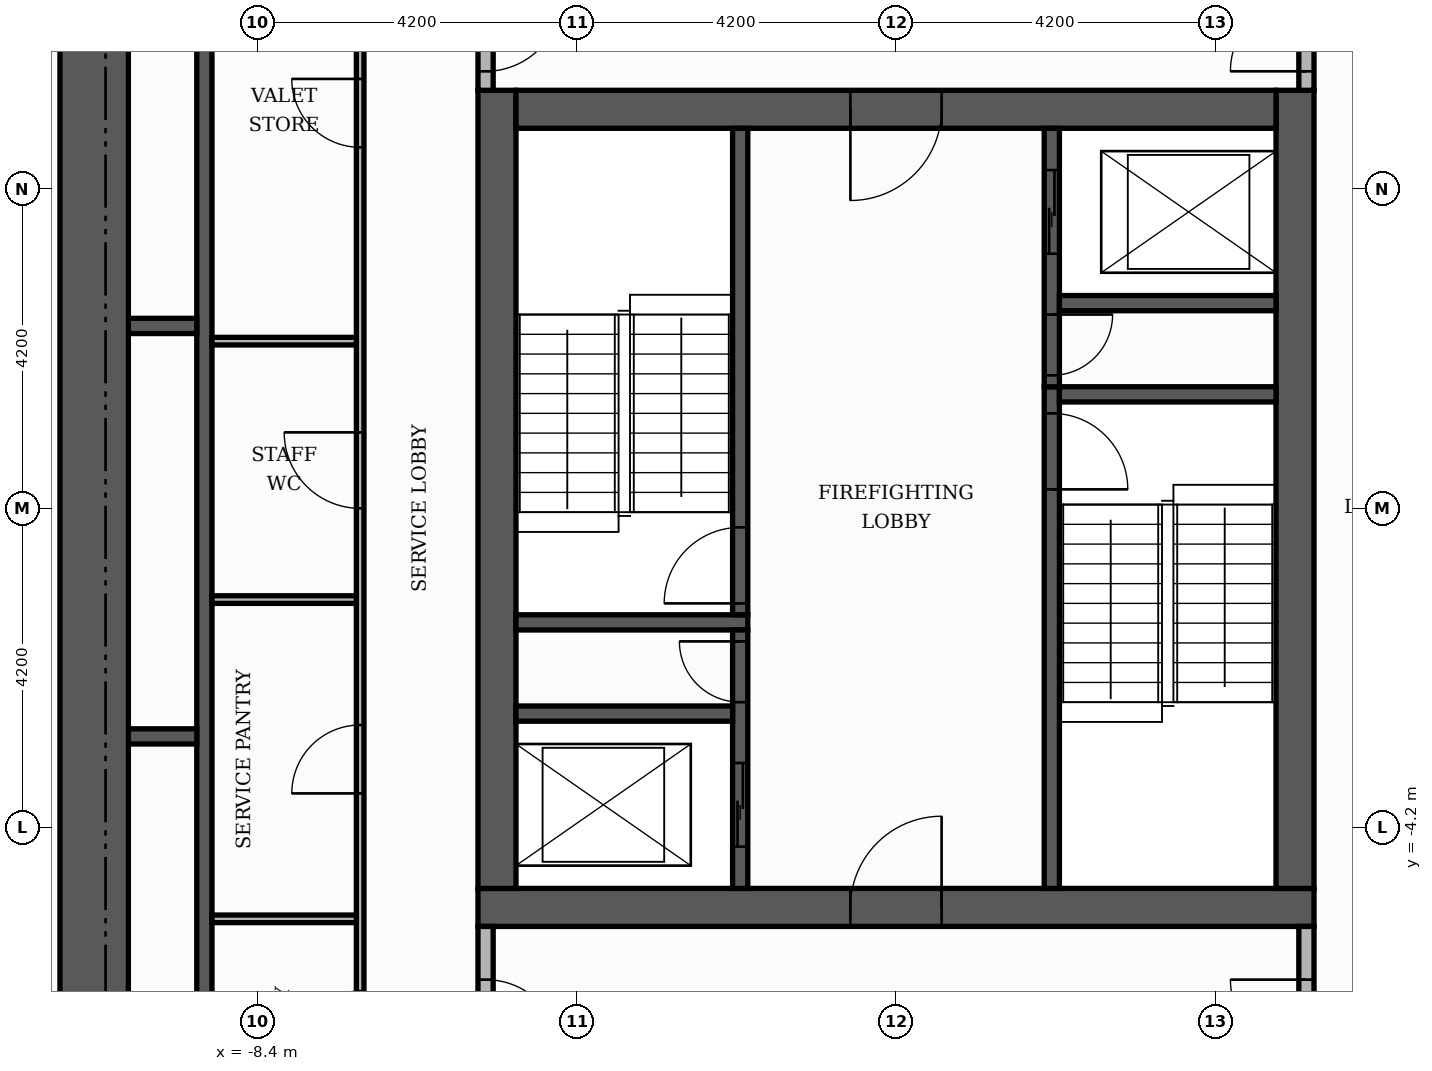
"""IFC4 building model, lengths in metres.
Left out: names, types, materials, properties, quantities, classifications, styles, units other than length and angle.
Written with IfcOpenShell. Run it as: python <this file> out.ifc"""

import sys

from ifc_helpers import new_model, si_unit, direction, frame, frame_2d, origin, place, context, subcontext, project, spatial, rectangle, extrude, element, fill, save


model = new_model("IFC4")
c1 = context("Model", 3, precision=1e-05, world=origin(), true_north=direction((0.0, 1.0)))
c2 = subcontext(c1, "Body", "Model", "MODEL_VIEW")
j1 = project(units=[si_unit("LENGTHUNIT", "METRE"), si_unit("PLANEANGLEUNIT", "RADIAN")], contexts=[c1])
p1 = place(None, origin())
s1 = spatial("IfcSite", under=j1, at=p1, CompositionType="ELEMENT")
p2 = place(p1, origin())
s2 = spatial("IfcBuilding", under=s1, at=p2, CompositionType="ELEMENT")
p3 = place(p2, frame((0.0, 0.0, 219.6)))
s3 = spatial("IfcBuildingStorey", under=s2, at=p3, CompositionType="ELEMENT", Elevation=219.6)
p4 = place(p3, frame((-5.5, -5.25, 0.0), z_axis=(0.0, 0.0, 1.0), x_axis=(1.0, 0.0, 0.0)))
e1 = element("IfcWall", 1, at=p4, inside=s3, PredefinedType="SHEAR", context=c2, shape_type="SweptSolid", body=[
    extrude(rectangle(XDim=11.0, YDim=0.5, at=frame_2d((5.5, 0.0))), origin(), (0.0, 0.0, 1.0), 3.48),
])
p5 = place(p4, frame((4.9, 0.0, 0.0)))
e2 = element("IfcOpeningElement", 2, at=p5, cuts=e1, PredefinedType="OPENING", context=c2, shape_type="SweptSolid", body=[
    extrude(rectangle(XDim=1.2, YDim=2.1, at=frame_2d((0.6, 1.05))), frame((0.0, 0.26, 0.0), z_axis=(0.0, -1.0, 0.0), x_axis=(1.0, 0.0, 0.0)), (0.0, 0.0, 1.0), 0.52),
])
for number, where, z_axis, x_axis in (
    (3, (-5.25, -5.0, 0.0), (0.0, 0.0, 1.0), (0.0, 1.0, 0.0)),
    (4, (5.25, -5.0, 0.0), (0.0, 0.0, 1.0), (0.0, 1.0, 0.0)),
):
    element("IfcWall", number, at=place(p3, frame(where, z_axis=z_axis, x_axis=x_axis)), inside=s3, PredefinedType="SHEAR", context=c2, shape_type="SweptSolid", body=[
        extrude(rectangle(XDim=10.5, YDim=0.5, at=frame_2d((5.25, 0.0))), origin(), (0.0, 0.0, 1.0), 3.48),
    ])
p6 = place(p3, frame((-5.0, 5.25, 0.0), z_axis=(0.0, 0.0, 1.0), x_axis=(1.0, 0.0, 0.0)))
e5 = element("IfcWall", 5, at=p6, inside=s3, PredefinedType="SHEAR", context=c2, shape_type="SweptSolid", body=[
    extrude(rectangle(XDim=10.0, YDim=0.5, at=frame_2d((5.0, 0.0))), origin(), (0.0, 0.0, 1.0), 3.48),
])
p7 = place(p6, frame((4.4, 0.0, 0.0)))
e6 = element("IfcOpeningElement", 6, at=p7, cuts=e5, PredefinedType="OPENING", context=c2, shape_type="SweptSolid", body=[
    extrude(rectangle(XDim=1.2, YDim=2.1, at=frame_2d((0.6, 1.05))), frame((0.0, 0.26, 0.0), z_axis=(0.0, -1.0, 0.0), x_axis=(1.0, 0.0, 0.0)), (0.0, 0.0, 1.0), 0.52),
])
p8 = place(p3, frame((2.05, -5.0, 0.0), z_axis=(0.0, 0.0, 1.0), x_axis=(0.0, 1.0, 0.0)))
e7 = element("IfcWall", 7, at=p8, inside=s3, PredefinedType="SHEAR", context=c2, shape_type="SweptSolid", body=[
    extrude(rectangle(XDim=6.6, YDim=0.2, at=frame_2d((3.3, 0.0))), origin(), (0.0, 0.0, 1.0), 3.48),
])
p9 = place(p8, frame((5.25, 0.0, 0.0)))
e8 = element("IfcOpeningElement", 8, at=p9, cuts=e7, PredefinedType="OPENING", context=c2, shape_type="SweptSolid", body=[
    extrude(rectangle(XDim=1.0, YDim=2.1, at=frame_2d((0.5, 1.05))), frame((0.0, 0.11, 0.0), z_axis=(0.0, -1.0, 0.0), x_axis=(1.0, 0.0, 0.0)), (0.0, 0.0, 1.0), 0.22),
])
p10 = place(p3, frame((-5.0, -1.5, 0.0), z_axis=(0.0, 0.0, 1.0), x_axis=(1.0, 0.0, 0.0)))
e9 = element("IfcWall", 9, at=p10, inside=s3, PredefinedType="SHEAR", context=c2, shape_type="SweptSolid", body=[
    extrude(rectangle(XDim=3.05, YDim=0.2, at=frame_2d((1.525, 0.0))), origin(), (0.0, 0.0, 1.0), 3.48),
])
p11 = place(p3, frame((-2.05, -1.4, 0.0), z_axis=(0.0, 0.0, 1.0), x_axis=(0.0, 1.0, 0.0)))
e10 = element("IfcWall", 10, at=p11, inside=s3, PredefinedType="SHEAR", context=c2, shape_type="SweptSolid", body=[
    extrude(rectangle(XDim=6.4, YDim=0.2, at=frame_2d((3.2, 0.0))), origin(), (0.0, 0.0, 1.0), 3.48),
])
p12 = place(p11, frame((0.15, 0.0, 0.0)))
e11 = element("IfcOpeningElement", 11, at=p12, cuts=e10, PredefinedType="OPENING", context=c2, shape_type="SweptSolid", body=[
    extrude(rectangle(XDim=1.0, YDim=2.1, at=frame_2d((0.5, 1.05))), frame((0.0, 0.11, 0.0), z_axis=(0.0, -1.0, 0.0), x_axis=(1.0, 0.0, 0.0)), (0.0, 0.0, 1.0), 0.22),
])
p13 = place(p3, frame((2.15, 1.5, 0.0), z_axis=(0.0, 0.0, 1.0), x_axis=(1.0, 0.0, 0.0)))
e12 = element("IfcWall", 12, at=p13, inside=s3, PredefinedType="SHEAR", context=c2, shape_type="SweptSolid", body=[
    extrude(rectangle(XDim=2.85, YDim=0.2, at=frame_2d((1.425, 0.0))), origin(), (0.0, 0.0, 1.0), 3.48),
])
p14 = place(p3, frame((-9.1, -8.2, 0.0), z_axis=(0.0, 0.0, 1.0), x_axis=(0.0, 1.0, 0.0)))
e13 = element("IfcWall", 13, at=p14, inside=s3, PredefinedType="SHEAR", context=c2, shape_type="SweptSolid", body=[
    extrude(rectangle(XDim=16.4, YDim=0.2, at=frame_2d((8.2, 0.0))), origin(), (0.0, 0.0, 1.0), 3.48),
])
p15 = place(p3, frame((-2.05, -5.0, 0.0), z_axis=(0.0, 0.0, 1.0), x_axis=(0.0, 1.0, 0.0)))
e14 = element("IfcWall", 14, at=p15, inside=s3, PredefinedType="SHEAR", context=c2, shape_type="SweptSolid", body=[
    extrude(rectangle(XDim=3.4, YDim=0.2, at=frame_2d((1.7, 0.0))), origin(), (0.0, 0.0, 1.0), 3.48),
])
p16 = place(p15, frame((0.55, 0.0, 0.0)))
e15 = element("IfcOpeningElement", 15, at=p16, cuts=e14, PredefinedType="OPENING", context=c2, shape_type="SweptSolid", body=[
    extrude(rectangle(XDim=1.1, YDim=2.1, at=frame_2d((0.55, 1.05))), frame((0.0, 0.11, 0.0), z_axis=(0.0, -1.0, 0.0), x_axis=(1.0, 0.0, 0.0)), (0.0, 0.0, 1.0), 0.22),
])
p17 = place(p15, frame((2.45, 0.0, 0.0)))
e16 = element("IfcOpeningElement", 16, at=p17, cuts=e14, PredefinedType="OPENING", context=c2, shape_type="SweptSolid", body=[
    extrude(rectangle(XDim=0.8, YDim=2.1, at=frame_2d((0.4, 1.05))), frame((0.0, 0.11, 0.0), z_axis=(0.0, -1.0, 0.0), x_axis=(1.0, 0.0, 0.0)), (0.0, 0.0, 1.0), 0.22),
])
p18 = place(p3, frame((-10.1, -3.0, 0.0), z_axis=(0.0, 0.0, 1.0), x_axis=(1.0, 0.0, 0.0)))
e17 = element("IfcWall", 17, at=p18, inside=s3, PredefinedType="SHEAR", context=c2, shape_type="SweptSolid", body=[
    extrude(rectangle(XDim=0.9, YDim=0.2, at=frame_2d((0.45, 0.0))), origin(), (0.0, 0.0, 1.0), 3.48),
])
p19 = place(p3, frame((-5.0, -2.7, 0.0), z_axis=(0.0, 0.0, 1.0), x_axis=(1.0, 0.0, 0.0)))
e18 = element("IfcWall", 18, at=p19, inside=s3, PredefinedType="SHEAR", context=c2, shape_type="SweptSolid", body=[
    extrude(rectangle(XDim=2.85, YDim=0.2, at=frame_2d((1.425, 0.0))), origin(), (0.0, 0.0, 1.0), 3.48),
])
p20 = place(p3, frame((2.05, 1.6, 0.0), z_axis=(0.0, 0.0, 1.0), x_axis=(0.0, 1.0, 0.0)))
e19 = element("IfcWall", 19, at=p20, inside=s3, PredefinedType="SHEAR", context=c2, shape_type="SweptSolid", body=[
    extrude(rectangle(XDim=3.4, YDim=0.2, at=frame_2d((1.7, 0.0))), origin(), (0.0, 0.0, 1.0), 3.48),
])
p21 = place(p20, frame((1.75, 0.0, 0.0)))
e20 = element("IfcOpeningElement", 20, at=p21, cuts=e19, PredefinedType="OPENING", context=c2, shape_type="SweptSolid", body=[
    extrude(rectangle(XDim=1.1, YDim=2.1, at=frame_2d((0.55, 1.05))), frame((0.0, 0.11, 0.0), z_axis=(0.0, -1.0, 0.0), x_axis=(1.0, 0.0, 0.0)), (0.0, 0.0, 1.0), 0.22),
])
p22 = place(p20, frame((0.15, 0.0, 0.0)))
e21 = element("IfcOpeningElement", 21, at=p22, cuts=e19, PredefinedType="OPENING", context=c2, shape_type="SweptSolid", body=[
    extrude(rectangle(XDim=0.8, YDim=2.1, at=frame_2d((0.4, 1.05))), frame((0.0, 0.11, 0.0), z_axis=(0.0, -1.0, 0.0), x_axis=(1.0, 0.0, 0.0)), (0.0, 0.0, 1.0), 0.22),
])
p23 = place(p3, frame((-10.1, 2.4, 0.0), z_axis=(0.0, 0.0, 1.0), x_axis=(1.0, 0.0, 0.0)))
e22 = element("IfcWall", 22, at=p23, inside=s3, PredefinedType="SHEAR", context=c2, shape_type="SweptSolid", body=[
    extrude(rectangle(XDim=0.9, YDim=0.2, at=frame_2d((0.45, 0.0))), origin(), (0.0, 0.0, 1.0), 3.48),
])
p24 = place(p3, frame((2.15, 2.7, 0.0), z_axis=(0.0, 0.0, 1.0), x_axis=(1.0, 0.0, 0.0)))
e23 = element("IfcWall", 23, at=p24, inside=s3, PredefinedType="SHEAR", context=c2, shape_type="SweptSolid", body=[
    extrude(rectangle(XDim=2.85, YDim=0.2, at=frame_2d((1.425, 0.0))), origin(), (0.0, 0.0, 1.0), 3.48),
])
p25 = place(p3, frame((-10.55, -10.1, 0.0), z_axis=(0.0, 0.0, 1.0), x_axis=(0.0, 1.0, 0.0)))
e24 = element("IfcWall", 24, at=p25, inside=s3, PredefinedType="SHEAR", context=c2, shape_type="SweptSolid", body=[
    extrude(rectangle(XDim=20.2, YDim=0.9, at=frame_2d((10.1, 0.0))), origin(), (0.0, 0.0, 1.0), 3.48),
])
p26 = place(p3, frame((-5.4, -10.1, 0.0), z_axis=(0.0, 0.0, 1.0), x_axis=(0.0, 1.0, 0.0)))
e25 = element("IfcWall", 25, at=p26, inside=s3, PredefinedType="PARTITIONING", context=c2, shape_type="SweptSolid", body=[
    extrude(rectangle(XDim=4.6, YDim=0.2, at=frame_2d((2.3, 0.0))), origin(), (0.0, 0.0, 1.0), 3.48),
])
p27 = place(p26, frame((2.9, 0.0, 0.0)))
e26 = element("IfcOpeningElement", 26, at=p27, cuts=e25, PredefinedType="OPENING", context=c2, shape_type="SweptSolid", body=[
    extrude(rectangle(XDim=1.0, YDim=2.1, at=frame_2d((0.5, 1.05))), frame((0.0, 0.11, 0.0), z_axis=(0.0, -1.0, 0.0), x_axis=(1.0, 0.0, 0.0)), (0.0, 0.0, 1.0), 0.22),
])
p28 = place(p3, frame((5.4, -10.1, 0.0), z_axis=(0.0, 0.0, 1.0), x_axis=(0.0, 1.0, 0.0)))
e27 = element("IfcWall", 27, at=p28, inside=s3, PredefinedType="PARTITIONING", context=c2, shape_type="SweptSolid", body=[
    extrude(rectangle(XDim=4.6, YDim=0.2, at=frame_2d((2.3, 0.0))), origin(), (0.0, 0.0, 1.0), 3.48),
])
p29 = place(p28, frame((2.9, 0.0, 0.0)))
e28 = element("IfcOpeningElement", 28, at=p29, cuts=e27, PredefinedType="OPENING", context=c2, shape_type="SweptSolid", body=[
    extrude(rectangle(XDim=1.0, YDim=2.1, at=frame_2d((0.5, 1.05))), frame((0.0, 0.11, 0.0), z_axis=(0.0, -1.0, 0.0), x_axis=(1.0, 0.0, 0.0)), (0.0, 0.0, 1.0), 0.22),
])
p30 = place(p3, frame((-7.05, -8.2, 0.0), z_axis=(0.0, 0.0, 1.0), x_axis=(0.0, 1.0, 0.0)))
e29 = element("IfcWall", 29, at=p30, inside=s3, PredefinedType="PARTITIONING", context=c2, shape_type="SweptSolid", body=[
    extrude(rectangle(XDim=16.4, YDim=0.1, at=frame_2d((8.2, 0.0))), origin(), (0.0, 0.0, 1.0), 3.48),
])
p31 = place(p30, frame((0.95, 0.0, 0.0)))
e30 = element("IfcOpeningElement", 30, at=p31, cuts=e29, PredefinedType="OPENING", context=c2, shape_type="SweptSolid", body=[
    extrude(rectangle(XDim=0.9, YDim=2.1, at=frame_2d((0.45, 1.05))), frame((0.0, 0.06, 0.0), z_axis=(0.0, -1.0, 0.0), x_axis=(1.0, 0.0, 0.0)), (0.0, 0.0, 1.0), 0.12),
])
p32 = place(p30, frame((4.45, 0.0, 0.0)))
e31 = element("IfcOpeningElement", 31, at=p32, cuts=e29, PredefinedType="OPENING", context=c2, shape_type="SweptSolid", body=[
    extrude(rectangle(XDim=0.9, YDim=2.1, at=frame_2d((0.45, 1.05))), frame((0.0, 0.06, 0.0), z_axis=(0.0, -1.0, 0.0), x_axis=(1.0, 0.0, 0.0)), (0.0, 0.0, 1.0), 0.12),
])
p33 = place(p30, frame((8.2, 0.0, 0.0)))
e32 = element("IfcOpeningElement", 32, at=p33, cuts=e29, PredefinedType="OPENING", context=c2, shape_type="SweptSolid", body=[
    extrude(rectangle(XDim=1.0, YDim=2.1, at=frame_2d((0.5, 1.05))), frame((0.0, 0.06, 0.0), z_axis=(0.0, -1.0, 0.0), x_axis=(1.0, 0.0, 0.0)), (0.0, 0.0, 1.0), 0.12),
])
p34 = place(p30, frame((12.95, 0.0, 0.0)))
e33 = element("IfcOpeningElement", 33, at=p34, cuts=e29, PredefinedType="OPENING", context=c2, shape_type="SweptSolid", body=[
    extrude(rectangle(XDim=0.9, YDim=2.1, at=frame_2d((0.45, 1.05))), frame((0.0, 0.06, 0.0), z_axis=(0.0, -1.0, 0.0), x_axis=(1.0, 0.0, 0.0)), (0.0, 0.0, 1.0), 0.12),
])
for number, where, z_axis, x_axis in (
    (34, (-9.0, -5.4, 0.0), (0.0, 0.0, 1.0), (1.0, 0.0, 0.0)),
    (35, (-9.0, -1.2, 0.0), (0.0, 0.0, 1.0), (1.0, 0.0, 0.0)),
    (36, (-9.0, 2.2, 0.0), (0.0, 0.0, 1.0), (1.0, 0.0, 0.0)),
):
    element("IfcWall", number, at=place(p3, frame(where, z_axis=z_axis, x_axis=x_axis)), inside=s3, PredefinedType="PARTITIONING", context=c2, shape_type="SweptSolid", body=[
        extrude(rectangle(XDim=1.9, YDim=0.1, at=frame_2d((0.95, 0.0))), origin(), (0.0, 0.0, 1.0), 3.48),
    ])
p35 = place(p3, frame((-5.4, 5.5, 0.0), z_axis=(0.0, 0.0, 1.0), x_axis=(0.0, 1.0, 0.0)))
e37 = element("IfcWall", 37, at=p35, inside=s3, PredefinedType="PARTITIONING", context=c2, shape_type="SweptSolid", body=[
    extrude(rectangle(XDim=1.55, YDim=0.2, at=frame_2d((0.775, 0.0))), origin(), (0.0, 0.0, 1.0), 3.48),
])
p36 = place(p35, frame((0.25, 0.0, 0.0)))
e38 = element("IfcOpeningElement", 38, at=p36, cuts=e37, PredefinedType="OPENING", context=c2, shape_type="SweptSolid", body=[
    extrude(rectangle(XDim=1.0, YDim=2.1, at=frame_2d((0.5, 1.05))), frame((0.0, 0.11, 0.0), z_axis=(0.0, -1.0, 0.0), x_axis=(1.0, 0.0, 0.0)), (0.0, 0.0, 1.0), 0.22),
])
p37 = place(p3, frame((5.4, 5.5, 0.0), z_axis=(0.0, 0.0, 1.0), x_axis=(0.0, 1.0, 0.0)))
e39 = element("IfcWall", 39, at=p37, inside=s3, PredefinedType="PARTITIONING", context=c2, shape_type="SweptSolid", body=[
    extrude(rectangle(XDim=4.6, YDim=0.2, at=frame_2d((2.3, 0.0))), origin(), (0.0, 0.0, 1.0), 3.48),
])
p38 = place(p37, frame((0.25, 0.0, 0.0)))
e40 = element("IfcOpeningElement", 40, at=p38, cuts=e39, PredefinedType="OPENING", context=c2, shape_type="SweptSolid", body=[
    extrude(rectangle(XDim=1.0, YDim=2.1, at=frame_2d((0.5, 1.05))), frame((0.0, 0.11, 0.0), z_axis=(0.0, -1.0, 0.0), x_axis=(1.0, 0.0, 0.0)), (0.0, 0.0, 1.0), 0.22),
])
p39 = place(p21, origin())
e41 = element("IfcDoor", 41, at=p39, inside=s3, OperationType="SLIDING_TO_LEFT", PredefinedType="DOOR", context=c2, shape_type="SweptSolid", body=[
    extrude(rectangle(XDim=1.1, YDim=2.1, at=frame_2d((0.55, 1.05))), frame((0.0, 0.025, 0.0), z_axis=(0.0, -1.0, 0.0), x_axis=(1.0, 0.0, 0.0)), (0.0, 0.0, 1.0), 0.05),
])
fill(e20, e41)
p40 = place(p16, origin())
e42 = element("IfcDoor", 42, at=p40, inside=s3, OperationType="SLIDING_TO_LEFT", PredefinedType="DOOR", context=c2, shape_type="SweptSolid", body=[
    extrude(rectangle(XDim=1.1, YDim=2.1, at=frame_2d((0.55, 1.05))), frame((0.0, 0.025, 0.0), z_axis=(0.0, -1.0, 0.0), x_axis=(1.0, 0.0, 0.0)), (0.0, 0.0, 1.0), 0.05),
])
fill(e15, e42)
p41 = place(p12, origin())
e43 = element("IfcDoor", 43, at=p41, inside=s3, OperationType="SINGLE_SWING_LEFT", PredefinedType="DOOR", context=c2, shape_type="SweptSolid", body=[
    extrude(rectangle(XDim=1.0, YDim=2.1, at=frame_2d((0.5, 1.05))), frame((0.0, 0.025, 0.0), z_axis=(0.0, -1.0, 0.0), x_axis=(1.0, 0.0, 0.0)), (0.0, 0.0, 1.0), 0.05),
])
fill(e11, e43)
p42 = place(p9, frame((1.0, 0.0, 0.0), z_axis=(0.0, 0.0, 1.0), x_axis=(-1.0, 0.0, 0.0)))
e44 = element("IfcDoor", 44, at=p42, inside=s3, OperationType="SINGLE_SWING_LEFT", PredefinedType="DOOR", context=c2, shape_type="SweptSolid", body=[
    extrude(rectangle(XDim=1.0, YDim=2.1, at=frame_2d((0.5, 1.05))), frame((0.0, 0.025, 0.0), z_axis=(0.0, -1.0, 0.0), x_axis=(1.0, 0.0, 0.0)), (0.0, 0.0, 1.0), 0.05),
])
fill(e8, e44)
p43 = place(p22, frame((0.8, 0.0, 0.0), z_axis=(0.0, 0.0, 1.0), x_axis=(-1.0, 0.0, 0.0)))
e45 = element("IfcDoor", 45, at=p43, inside=s3, OperationType="SINGLE_SWING_RIGHT", PredefinedType="DOOR", context=c2, shape_type="SweptSolid", body=[
    extrude(rectangle(XDim=0.8, YDim=2.1, at=frame_2d((0.4, 1.05))), frame((0.0, 0.025, 0.0), z_axis=(0.0, -1.0, 0.0), x_axis=(1.0, 0.0, 0.0)), (0.0, 0.0, 1.0), 0.05),
])
fill(e21, e45)
p44 = place(p17, origin())
e46 = element("IfcDoor", 46, at=p44, inside=s3, OperationType="SINGLE_SWING_RIGHT", PredefinedType="DOOR", context=c2, shape_type="SweptSolid", body=[
    extrude(rectangle(XDim=0.8, YDim=2.1, at=frame_2d((0.4, 1.05))), frame((0.0, 0.025, 0.0), z_axis=(0.0, -1.0, 0.0), x_axis=(1.0, 0.0, 0.0)), (0.0, 0.0, 1.0), 0.05),
])
fill(e16, e46)
p45 = place(p7, frame((1.2, 0.0, 0.0), z_axis=(0.0, 0.0, 1.0), x_axis=(-1.0, 0.0, 0.0)))
e47 = element("IfcDoor", 47, at=p45, inside=s3, OperationType="SINGLE_SWING_LEFT", PredefinedType="DOOR", context=c2, shape_type="SweptSolid", body=[
    extrude(rectangle(XDim=1.2, YDim=2.1, at=frame_2d((0.6, 1.05))), frame((0.0, 0.025, 0.0), z_axis=(0.0, -1.0, 0.0), x_axis=(1.0, 0.0, 0.0)), (0.0, 0.0, 1.0), 0.05),
])
fill(e6, e47)
p46 = place(p5, origin())
e48 = element("IfcDoor", 48, at=p46, inside=s3, OperationType="SINGLE_SWING_RIGHT", PredefinedType="DOOR", context=c2, shape_type="SweptSolid", body=[
    extrude(rectangle(XDim=1.2, YDim=2.1, at=frame_2d((0.6, 1.05))), frame((0.0, 0.025, 0.0), z_axis=(0.0, -1.0, 0.0), x_axis=(1.0, 0.0, 0.0)), (0.0, 0.0, 1.0), 0.05),
])
fill(e2, e48)
p47 = place(p36, frame((1.0, 0.0, 0.0), z_axis=(0.0, 0.0, 1.0), x_axis=(-1.0, 0.0, 0.0)))
e49 = element("IfcDoor", 49, at=p47, inside=s3, OperationType="SINGLE_SWING_RIGHT", PredefinedType="DOOR", context=c2, shape_type="SweptSolid", body=[
    extrude(rectangle(XDim=1.0, YDim=2.1, at=frame_2d((0.5, 1.05))), frame((0.0, 0.025, 0.0), z_axis=(0.0, -1.0, 0.0), x_axis=(1.0, 0.0, 0.0)), (0.0, 0.0, 1.0), 0.05),
])
fill(e38, e49)
p48 = place(p38, origin())
e50 = element("IfcDoor", 50, at=p48, inside=s3, OperationType="SINGLE_SWING_LEFT", PredefinedType="DOOR", context=c2, shape_type="SweptSolid", body=[
    extrude(rectangle(XDim=1.0, YDim=2.1, at=frame_2d((0.5, 1.05))), frame((0.0, 0.025, 0.0), z_axis=(0.0, -1.0, 0.0), x_axis=(1.0, 0.0, 0.0)), (0.0, 0.0, 1.0), 0.05),
])
fill(e40, e50)
p49 = place(p27, frame((1.0, 0.0, 0.0), z_axis=(0.0, 0.0, 1.0), x_axis=(-1.0, 0.0, 0.0)))
e51 = element("IfcDoor", 51, at=p49, inside=s3, OperationType="SINGLE_SWING_LEFT", PredefinedType="DOOR", context=c2, shape_type="SweptSolid", body=[
    extrude(rectangle(XDim=1.0, YDim=2.1, at=frame_2d((0.5, 1.05))), frame((0.0, 0.025, 0.0), z_axis=(0.0, -1.0, 0.0), x_axis=(1.0, 0.0, 0.0)), (0.0, 0.0, 1.0), 0.05),
])
fill(e26, e51)
p50 = place(p29, origin())
e52 = element("IfcDoor", 52, at=p50, inside=s3, OperationType="SINGLE_SWING_RIGHT", PredefinedType="DOOR", context=c2, shape_type="SweptSolid", body=[
    extrude(rectangle(XDim=1.0, YDim=2.1, at=frame_2d((0.5, 1.05))), frame((0.0, 0.025, 0.0), z_axis=(0.0, -1.0, 0.0), x_axis=(1.0, 0.0, 0.0)), (0.0, 0.0, 1.0), 0.05),
])
fill(e28, e52)
p51 = place(p32, origin())
e53 = element("IfcDoor", 53, at=p51, inside=s3, OperationType="SINGLE_SWING_LEFT", PredefinedType="DOOR", context=c2, shape_type="SweptSolid", body=[
    extrude(rectangle(XDim=0.9, YDim=2.1, at=frame_2d((0.45, 1.05))), frame((0.0, 0.025, 0.0), z_axis=(0.0, -1.0, 0.0), x_axis=(1.0, 0.0, 0.0)), (0.0, 0.0, 1.0), 0.05),
])
fill(e31, e53)
p52 = place(p33, origin())
e54 = element("IfcDoor", 54, at=p52, inside=s3, OperationType="SINGLE_SWING_RIGHT", PredefinedType="DOOR", context=c2, shape_type="SweptSolid", body=[
    extrude(rectangle(XDim=1.0, YDim=2.1, at=frame_2d((0.5, 1.05))), frame((0.0, 0.025, 0.0), z_axis=(0.0, -1.0, 0.0), x_axis=(1.0, 0.0, 0.0)), (0.0, 0.0, 1.0), 0.05),
])
fill(e32, e54)
p53 = place(p34, origin())
e55 = element("IfcDoor", 55, at=p53, inside=s3, OperationType="SINGLE_SWING_RIGHT", PredefinedType="DOOR", context=c2, shape_type="SweptSolid", body=[
    extrude(rectangle(XDim=0.9, YDim=2.1, at=frame_2d((0.45, 1.05))), frame((0.0, 0.025, 0.0), z_axis=(0.0, -1.0, 0.0), x_axis=(1.0, 0.0, 0.0)), (0.0, 0.0, 1.0), 0.05),
])
fill(e33, e55)
save(model, sys.argv[1])
